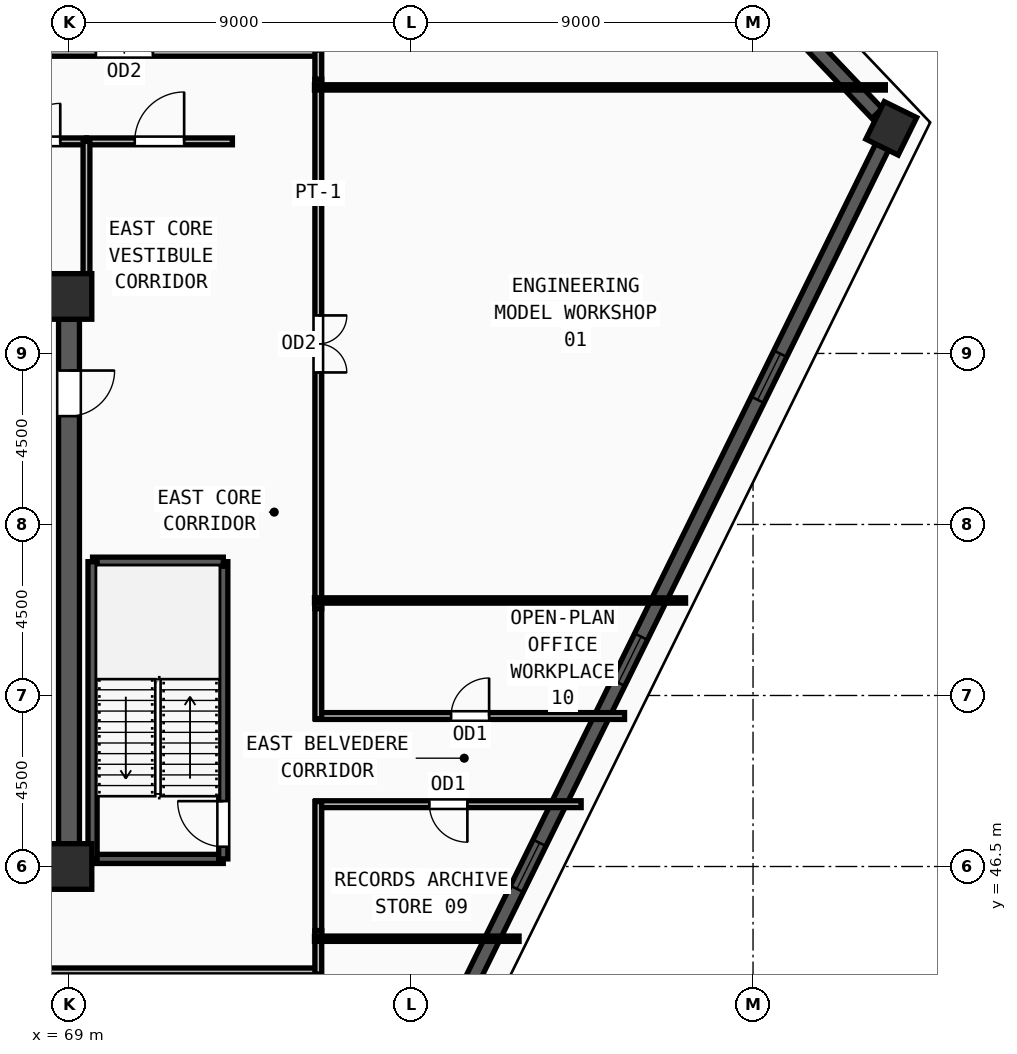
"""IFC4 building model, lengths in metres.
Left out: names, types, materials, properties, quantities, classifications, styles, units other than length and angle.
Written with IfcOpenShell. Run it as: python <this file> out.ifc"""

import sys

from ifc_helpers import new_model, si_unit, direction, frame, frame_2d, origin, origin_2d, place, context, subcontext, project, spatial, rectangle, extrude, source, transform, mapped, element, fill, save


model = new_model("IFC4")
c1 = context("Model", 3, precision=1e-05, world=origin(), true_north=direction((0.0, 1.0)))
c2 = subcontext(c1, "Body", "Model", "MODEL_VIEW")
j1 = project(units=[si_unit("LENGTHUNIT", "METRE"), si_unit("PLANEANGLEUNIT", "RADIAN")], contexts=[c1])
p1 = place(None, origin())
s1 = spatial("IfcSite", under=j1, at=p1, CompositionType="ELEMENT")
p2 = place(p1, origin())
s2 = spatial("IfcBuilding", under=s1, at=p2, CompositionType="ELEMENT")
p3 = place(p2, frame((0.0, 0.0, 286.5)))
s3 = spatial("IfcBuildingStorey", under=s2, at=p3, CompositionType="ELEMENT", Elevation=286.5)
m1 = source(origin(), c2, "Body", "SweptSolid", [
    extrude(rectangle(XDim=1.2, YDim=1.2, at=origin_2d()), origin(), (0.0, 0.0, 1.0), 3.75),
])
for number, where, z_axis, x_axis in (
    (1, (69.0, 46.5, 0.0), (0.0, 0.0, 1.0), (1.0, 0.0, 0.0)),
    (2, (69.0, 61.5, 0.0), (0.0, 0.0, 1.0), (1.0, 0.0, 0.0)),
):
    element("IfcColumn", number, at=place(p3, frame(where, z_axis=z_axis, x_axis=x_axis)), inside=s3, PredefinedType="COLUMN", context=c2, shape_type="MappedRepresentation", body=[
        mapped(m1, transform((0.0, 0.0, 0.0), x_axis=(1.0, 0.0, 0.0), y_axis=(0.0, 1.0, 0.0), z_axis=(0.0, 0.0, 1.0), scale=1.0)),
    ])
m2 = source(origin(), c2, "Body", "SweptSolid", [
    extrude(rectangle(XDim=1.1, YDim=0.95, at=origin_2d()), origin(), (0.0, 0.0, 1.0), 3.75),
])
p4 = place(p3, frame((90.637, 65.923, 0.0), z_axis=(0.0, 0.0, 1.0), x_axis=(0.441662447194, 0.897181298701, 0.0)))
e3 = element("IfcColumn", 3, at=p4, inside=s3, PredefinedType="COLUMN", context=c2, shape_type="MappedRepresentation", body=[
    mapped(m2, transform((0.0, 0.0, 0.0), x_axis=(1.0, 0.0, 0.0), y_axis=(0.0, 1.0, 0.0), z_axis=(0.0, 0.0, 1.0), scale=1.0)),
])
p5 = place(p3, frame((78.48, 41.226, 0.0), z_axis=(0.0, 0.0, 1.0), x_axis=(0.441646832519, 0.89718898529, 0.0)))
e4 = element("IfcWall", 4, at=p5, inside=s3, PredefinedType="SOLIDWALL", context=c2, shape_type="SweptSolid", body=[
    extrude(rectangle(XDim=26.988, YDim=0.38, at=frame_2d((13.494, 0.0))), origin(), (0.0, 0.0, 1.0), 3.57),
])
m3 = source(origin(), c2, "Body", "SweptSolid", [
    extrude(rectangle(XDim=1.35, YDim=1.85, at=frame_2d((0.675, 0.925))), frame((0.0, 0.2, 0.0), z_axis=(0.0, -1.0, 0.0), x_axis=(1.0, 0.0, 0.0)), (0.0, 0.0, 1.0), 0.4),
])
p6 = place(p5, frame((5.222, 0.0, 0.55)))
e5 = element("IfcOpeningElement", 5, at=p6, cuts=e4, PredefinedType="OPENING", context=c2, shape_type="MappedRepresentation", body=[
    mapped(m3, transform((0.0, 0.0, 0.0), x_axis=(1.0, 0.0, 0.0), y_axis=(0.0, 1.0, 0.0), z_axis=(0.0, 0.0, 1.0), scale=1.0)),
])
p7 = place(p5, frame((11.269, 0.0, 0.55)))
e6 = element("IfcOpeningElement", 6, at=p7, cuts=e4, PredefinedType="OPENING", context=c2, shape_type="MappedRepresentation", body=[
    mapped(m3, transform((0.0, 0.0, 0.0), x_axis=(1.0, 0.0, 0.0), y_axis=(0.0, 1.0, 0.0), z_axis=(0.0, 0.0, 1.0), scale=1.0)),
])
p8 = place(p5, frame((19.566, 0.0, 0.55)))
e7 = element("IfcOpeningElement", 7, at=p8, cuts=e4, PredefinedType="OPENING", context=c2, shape_type="MappedRepresentation", body=[
    mapped(m3, transform((0.0, 0.0, 0.0), x_axis=(1.0, 0.0, 0.0), y_axis=(0.0, 1.0, 0.0), z_axis=(0.0, 0.0, 1.0), scale=1.0)),
])
p9 = place(p3, frame((90.265, 66.314, 0.0), z_axis=(0.0, 0.0, 1.0), x_axis=(-0.689378640733, 0.724401193885, 0.0)))
e8 = element("IfcWall", 8, at=p9, inside=s3, PredefinedType="SOLIDWALL", context=c2, shape_type="SweptSolid", body=[
    extrude(rectangle(XDim=4.057, YDim=0.38, at=frame_2d((2.029, 0.0))), origin(), (0.0, 0.0, 1.0), 3.57),
])
p10 = place(p3, frame((69.0, 60.9, 0.0), z_axis=(0.0, 0.0, 1.0), x_axis=(0.0, -1.0, 0.0)))
e9 = element("IfcWall", 9, at=p10, inside=s3, PredefinedType="SHEAR", context=c2, shape_type="SweptSolid", body=[
    extrude(rectangle(XDim=13.8, YDim=0.55, at=frame_2d((6.9, 0.0))), origin(), (0.0, 0.0, 1.0), 3.57),
])
m4 = source(origin(), c2, "Body", "SweptSolid", [
    extrude(rectangle(XDim=1.2, YDim=2.2, at=frame_2d((0.6, 1.1))), frame((0.0, 0.285, 0.0), z_axis=(0.0, -1.0, 0.0), x_axis=(1.0, 0.0, 0.0)), (0.0, 0.0, 1.0), 0.57),
])
p11 = place(p10, frame((1.35, 0.0, 0.0)))
e10 = element("IfcOpeningElement", 10, at=p11, cuts=e9, PredefinedType="OPENING", context=c2, shape_type="MappedRepresentation", body=[
    mapped(m4, transform((0.0, 0.0, 0.0), x_axis=(1.0, 0.0, 0.0), y_axis=(0.0, 1.0, 0.0), z_axis=(0.0, 0.0, 1.0), scale=1.0)),
])
p12 = place(p3, frame((69.62, 46.7, 0.0), z_axis=(0.0, 0.0, 1.0), x_axis=(1.0, 0.0, 0.0)))
e11 = element("IfcWall", 11, at=p12, inside=s3, PredefinedType="SOLIDWALL", context=c2, shape_type="SweptSolid", body=[
    extrude(rectangle(XDim=3.44, YDim=0.24, at=frame_2d((1.72, 0.0))), origin(), (0.0, 0.0, 1.0), 3.57),
])
p13 = place(p3, frame((73.06, 46.7, 0.0), z_axis=(0.0, 0.0, 1.0), x_axis=(0.0, 1.0, 0.0)))
e12 = element("IfcWall", 12, at=p13, inside=s3, PredefinedType="SOLIDWALL", context=c2, shape_type="SweptSolid", body=[
    extrude(rectangle(XDim=7.82, YDim=0.24, at=frame_2d((3.91, 0.0))), origin(), (0.0, 0.0, 1.0), 3.57),
])
m5 = source(origin(), c2, "Body", "SweptSolid", [
    extrude(rectangle(XDim=1.2, YDim=2.2, at=frame_2d((0.6, 1.1))), frame((0.0, 0.13, 0.0), z_axis=(0.0, -1.0, 0.0), x_axis=(1.0, 0.0, 0.0)), (0.0, 0.0, 1.0), 0.26),
])
p14 = place(p13, frame((0.32, 0.0, 0.0)))
e13 = element("IfcOpeningElement", 13, at=p14, cuts=e12, PredefinedType="OPENING", context=c2, shape_type="MappedRepresentation", body=[
    mapped(m5, transform((0.0, 0.0, 0.0), x_axis=(1.0, 0.0, 0.0), y_axis=(0.0, 1.0, 0.0), z_axis=(0.0, 0.0, 1.0), scale=1.0)),
])
p15 = place(p3, frame((73.06, 54.52, 0.0), z_axis=(0.0, 0.0, 1.0), x_axis=(-1.0, 0.0, 0.0)))
e14 = element("IfcWall", 14, at=p15, inside=s3, PredefinedType="SOLIDWALL", context=c2, shape_type="SweptSolid", body=[
    extrude(rectangle(XDim=3.44, YDim=0.24, at=frame_2d((1.72, 0.0))), origin(), (0.0, 0.0, 1.0), 3.57),
])
p16 = place(p3, frame((69.62, 54.52, 0.0), z_axis=(0.0, 0.0, 1.0), x_axis=(0.0, -1.0, 0.0)))
e15 = element("IfcWall", 15, at=p16, inside=s3, PredefinedType="SOLIDWALL", context=c2, shape_type="SweptSolid", body=[
    extrude(rectangle(XDim=7.82, YDim=0.24, at=frame_2d((3.91, 0.0))), origin(), (0.0, 0.0, 1.0), 3.57),
])
p17 = place(p3, frame((67.08, 65.58, 0.0), z_axis=(0.0, 0.0, 1.0), x_axis=(1.0, 0.0, 0.0)))
e16 = element("IfcWall", 16, at=p17, inside=s3, PredefinedType="PARTITIONING", context=c2, shape_type="SweptSolid", body=[
    extrude(rectangle(XDim=2.38, YDim=0.18, at=frame_2d((1.19, 0.0))), origin(), (0.0, 0.0, 1.0), 3.57),
])
m6 = source(origin(), c2, "Body", "SweptSolid", [
    extrude(rectangle(XDim=1.0, YDim=2.2, at=frame_2d((0.5, 1.1))), frame((0.0, 0.1, 0.0), z_axis=(0.0, -1.0, 0.0), x_axis=(1.0, 0.0, 0.0)), (0.0, 0.0, 1.0), 0.2),
])
p18 = place(p17, frame((0.69, 0.0, 0.0)))
e17 = element("IfcOpeningElement", 17, at=p18, cuts=e16, PredefinedType="OPENING", context=c2, shape_type="MappedRepresentation", body=[
    mapped(m6, transform((0.0, 0.0, 0.0), x_axis=(1.0, 0.0, 0.0), y_axis=(0.0, 1.0, 0.0), z_axis=(0.0, 0.0, 1.0), scale=1.0)),
])
p19 = place(p3, frame((69.46, 65.58, 0.0), z_axis=(0.0, 0.0, 1.0), x_axis=(1.0, 0.0, 0.0)))
e18 = element("IfcWall", 18, at=p19, inside=s3, PredefinedType="PARTITIONING", context=c2, shape_type="SweptSolid", body=[
    extrude(rectangle(XDim=3.84, YDim=0.18, at=frame_2d((1.92, 0.0))), origin(), (0.0, 0.0, 1.0), 3.57),
])
m7 = source(origin(), c2, "Body", "SweptSolid", [
    extrude(rectangle(XDim=1.3, YDim=2.2, at=frame_2d((0.65, 1.1))), frame((0.0, 0.1, 0.0), z_axis=(0.0, -1.0, 0.0), x_axis=(1.0, 0.0, 0.0)), (0.0, 0.0, 1.0), 0.2),
])
p20 = place(p19, frame((1.27, 0.0, 0.0)))
e19 = element("IfcOpeningElement", 19, at=p20, cuts=e18, PredefinedType="OPENING", context=c2, shape_type="MappedRepresentation", body=[
    mapped(m7, transform((0.0, 0.0, 0.0), x_axis=(1.0, 0.0, 0.0), y_axis=(0.0, 1.0, 0.0), z_axis=(0.0, 0.0, 1.0), scale=1.0)),
])
p21 = place(p3, frame((75.56, 67.215, 0.0), z_axis=(0.0, 0.0, 1.0), x_axis=(0.0, -1.0, 0.0)))
e20 = element("IfcWall", 20, at=p21, inside=s3, PredefinedType="PARTITIONING", context=c2, shape_type="SweptSolid", body=[
    extrude(rectangle(XDim=13.93, YDim=0.18, at=frame_2d((6.965, 0.0))), origin(), (0.0, 0.0, 1.0), 3.57),
])
m8 = source(origin(), c2, "Body", "SweptSolid", [
    extrude(rectangle(XDim=1.5, YDim=2.2, at=frame_2d((0.75, 1.1))), frame((0.0, 0.1, 0.0), z_axis=(0.0, -1.0, 0.0), x_axis=(1.0, 0.0, 0.0)), (0.0, 0.0, 1.0), 0.2),
])
p22 = place(p21, frame((6.215, 0.0, 0.0)))
e21 = element("IfcOpeningElement", 21, at=p22, cuts=e20, PredefinedType="OPENING", context=c2, shape_type="MappedRepresentation", body=[
    mapped(m8, transform((0.0, 0.0, 0.0), x_axis=(1.0, 0.0, 0.0), y_axis=(0.0, 1.0, 0.0), z_axis=(0.0, 0.0, 1.0), scale=1.0)),
])
p23 = place(p3, frame((65.285, 67.91, 0.0), z_axis=(0.0, 0.0, 1.0), x_axis=(1.0, 0.0, 0.0)))
e22 = element("IfcWall", 22, at=p23, inside=s3, PredefinedType="PARTITIONING", context=c2, shape_type="SweptSolid", body=[
    extrude(rectangle(XDim=10.345, YDim=0.18, at=frame_2d((5.172, 0.0))), origin(), (0.0, 0.0, 1.0), 3.261),
])
p24 = place(p23, frame((4.422, 0.0, 0.0)))
e23 = element("IfcOpeningElement", 23, at=p24, cuts=e22, PredefinedType="OPENING", context=c2, shape_type="MappedRepresentation", body=[
    mapped(m8, transform((0.0, 0.0, 0.0), x_axis=(1.0, 0.0, 0.0), y_axis=(0.0, 1.0, 0.0), z_axis=(0.0, 0.0, 1.0), scale=1.0)),
])
p25 = place(p3, frame((75.63, 43.74, 0.0), z_axis=(0.0, 0.0, 1.0), x_axis=(-1.0, 0.0, 0.0)))
e24 = element("IfcWall", 24, at=p25, inside=s3, PredefinedType="PARTITIONING", context=c2, shape_type="SweptSolid", body=[
    extrude(rectangle(XDim=20.915, YDim=0.18, at=frame_2d((10.458, 0.0))), origin(), (0.0, 0.0, 1.0), 3.57),
])
p26 = place(p25, frame((9.707, 0.0, 0.0)))
e25 = element("IfcOpeningElement", 25, at=p26, cuts=e24, PredefinedType="OPENING", context=c2, shape_type="MappedRepresentation", body=[
    mapped(m8, transform((0.0, 0.0, 0.0), x_axis=(1.0, 0.0, 0.0), y_axis=(0.0, 1.0, 0.0), z_axis=(0.0, 0.0, 1.0), scale=1.0)),
])
p27 = place(p3, frame((82.477, 48.14, 0.0), z_axis=(0.0, 0.0, 1.0), x_axis=(-1.0, 0.0, 0.0)))
e26 = element("IfcWall", 26, at=p27, inside=s3, PredefinedType="PARTITIONING", context=c2, shape_type="SweptSolid", body=[
    extrude(rectangle(XDim=6.987, YDim=0.18, at=frame_2d((3.494, 0.0))), origin(), (0.0, 0.0, 1.0), 3.57),
])
p28 = place(p27, frame((2.994, 0.0, 0.0)))
e27 = element("IfcOpeningElement", 27, at=p28, cuts=e26, PredefinedType="OPENING", context=c2, shape_type="MappedRepresentation", body=[
    mapped(m6, transform((0.0, 0.0, 0.0), x_axis=(1.0, 0.0, 0.0), y_axis=(0.0, 1.0, 0.0), z_axis=(0.0, 0.0, 1.0), scale=1.0)),
])
p29 = place(p3, frame((75.49, 50.46, 0.0), z_axis=(0.0, 0.0, 1.0), x_axis=(1.0, 0.0, 0.0)))
e28 = element("IfcWall", 28, at=p29, inside=s3, PredefinedType="PARTITIONING", context=c2, shape_type="SweptSolid", body=[
    extrude(rectangle(XDim=8.129, YDim=0.18, at=frame_2d((4.064, 0.0))), origin(), (0.0, 0.0, 1.0), 3.57),
])
p30 = place(p29, frame((3.565, 0.0, 0.0)))
e29 = element("IfcOpeningElement", 29, at=p30, cuts=e28, PredefinedType="OPENING", context=c2, shape_type="MappedRepresentation", body=[
    mapped(m6, transform((0.0, 0.0, 0.0), x_axis=(1.0, 0.0, 0.0), y_axis=(0.0, 1.0, 0.0), z_axis=(0.0, 0.0, 1.0), scale=1.0)),
])
p31 = place(p3, frame((69.46, 61.95, 0.0), z_axis=(0.0, 0.0, 1.0), x_axis=(0.0, 1.0, 0.0)))
e30 = element("IfcWall", 30, at=p31, inside=s3, PredefinedType="PARTITIONING", context=c2, shape_type="SweptSolid", body=[
    extrude(rectangle(XDim=3.63, YDim=0.18, at=frame_2d((1.815, 0.0))), origin(), (0.0, 0.0, 1.0), 3.57),
])
p32 = place(p3, frame((75.56, 67.98, 0.0), z_axis=(0.0, 0.0, 1.0), x_axis=(0.0, -1.0, 0.0)))
e31 = element("IfcWall", 31, at=p32, inside=s3, PredefinedType="PARTITIONING", context=c2, shape_type="SweptSolid", body=[
    extrude(rectangle(XDim=0.765, YDim=0.18, at=frame_2d((0.382, 0.0))), origin(), (0.0, 0.0, 1.0), 3.57),
])
p33 = place(p3, frame((75.56, 44.815, 0.0), z_axis=(0.0, 0.0, 1.0), x_axis=(0.0, -1.0, 0.0)))
e32 = element("IfcWall", 32, at=p33, inside=s3, PredefinedType="PARTITIONING", context=c2, shape_type="SweptSolid", body=[
    extrude(rectangle(XDim=1.145, YDim=0.18, at=frame_2d((0.573, 0.0))), origin(), (0.0, 0.0, 1.0), 3.57),
])
p34 = place(p3, frame((75.56, 48.21, 0.0), z_axis=(0.0, 0.0, 1.0), x_axis=(0.0, -1.0, 0.0)))
e33 = element("IfcWall", 33, at=p34, inside=s3, PredefinedType="PARTITIONING", context=c2, shape_type="SweptSolid", body=[
    extrude(rectangle(XDim=3.395, YDim=0.18, at=frame_2d((1.698, 0.0))), origin(), (0.0, 0.0, 1.0), 3.57),
])
p35 = place(p3, frame((75.56, 53.285, 0.0), z_axis=(0.0, 0.0, 1.0), x_axis=(0.0, -1.0, 0.0)))
e34 = element("IfcWall", 34, at=p35, inside=s3, PredefinedType="PARTITIONING", context=c2, shape_type="SweptSolid", body=[
    extrude(rectangle(XDim=2.895, YDim=0.18, at=frame_2d((1.448, 0.0))), origin(), (0.0, 0.0, 1.0), 3.57),
])
p36 = place(p3, frame((75.46, 44.6, 0.0), z_axis=(0.0, 0.0, 1.0), x_axis=(1.0, 0.0, 0.0)))
e35 = element("IfcWall", 35, at=p36, inside=s3, PredefinedType="PARTITIONING", context=c2, shape_type="SweptSolid", body=[
    extrude(rectangle(XDim=5.383, YDim=0.14, at=frame_2d((2.691, 0.0))), origin(), (0.0, 0.0, 1.0), 3.57),
])
p37 = place(p3, frame((75.46, 53.5, 0.0), z_axis=(0.0, 0.0, 1.0), x_axis=(1.0, 0.0, 0.0)))
e36 = element("IfcWall", 36, at=p37, inside=s3, PredefinedType="PARTITIONING", context=c2, shape_type="SweptSolid", body=[
    extrude(rectangle(XDim=9.764, YDim=0.14, at=frame_2d((4.882, 0.0))), origin(), (0.0, 0.0, 1.0), 3.57),
])
p38 = place(p3, frame((75.46, 67.0, 0.0), z_axis=(0.0, 0.0, 1.0), x_axis=(1.0, 0.0, 0.0)))
e37 = element("IfcWall", 37, at=p38, inside=s3, PredefinedType="PARTITIONING", context=c2, shape_type="SweptSolid", body=[
    extrude(rectangle(XDim=15.021, YDim=0.14, at=frame_2d((7.51, 0.0))), origin(), (0.0, 0.0, 1.0), 3.57),
])
m9 = source(origin(), c2, "Body", "SweptSolid", [
    extrude(rectangle(XDim=1.35, YDim=1.85, at=frame_2d((0.675, 0.925))), frame((0.0, 0.03, 0.0), z_axis=(0.0, -1.0, 0.0), x_axis=(1.0, 0.0, 0.0)), (0.0, 0.0, 1.0), 0.06),
])
p39 = place(p6, origin())
e38 = element("IfcWindow", 38, at=p39, inside=s3, PartitioningType="SINGLE_PANEL", PredefinedType="WINDOW", context=c2, shape_type="MappedRepresentation", body=[
    mapped(m9, transform((0.0, 0.0, 0.0), x_axis=(1.0, 0.0, 0.0), y_axis=(0.0, 1.0, 0.0), z_axis=(0.0, 0.0, 1.0), scale=1.0)),
])
fill(e5, e38)
p40 = place(p7, origin())
e39 = element("IfcWindow", 39, at=p40, inside=s3, PartitioningType="SINGLE_PANEL", PredefinedType="WINDOW", context=c2, shape_type="MappedRepresentation", body=[
    mapped(m9, transform((0.0, 0.0, 0.0), x_axis=(1.0, 0.0, 0.0), y_axis=(0.0, 1.0, 0.0), z_axis=(0.0, 0.0, 1.0), scale=1.0)),
])
fill(e6, e39)
p41 = place(p8, origin())
e40 = element("IfcWindow", 40, at=p41, inside=s3, PartitioningType="SINGLE_PANEL", PredefinedType="WINDOW", context=c2, shape_type="MappedRepresentation", body=[
    mapped(m9, transform((0.0, 0.0, 0.0), x_axis=(1.0, 0.0, 0.0), y_axis=(0.0, 1.0, 0.0), z_axis=(0.0, 0.0, 1.0), scale=1.0)),
])
fill(e7, e40)
m10 = source(origin(), c2, "Body", "SweptSolid", [
    extrude(rectangle(XDim=1.2, YDim=2.2, at=frame_2d((0.6, 1.1))), frame((0.0, 0.025, 0.0), z_axis=(0.0, -1.0, 0.0), x_axis=(1.0, 0.0, 0.0)), (0.0, 0.0, 1.0), 0.05),
])
p42 = place(p11, origin())
e41 = element("IfcDoor", 41, at=p42, inside=s3, OperationType="SINGLE_SWING_LEFT", PredefinedType="DOOR", context=c2, shape_type="MappedRepresentation", body=[
    mapped(m10, transform((0.0, 0.0, 0.0), x_axis=(1.0, 0.0, 0.0), y_axis=(0.0, 1.0, 0.0), z_axis=(0.0, 0.0, 1.0), scale=1.0)),
])
fill(e10, e41)
p43 = place(p14, origin())
e42 = element("IfcDoor", 42, at=p43, inside=s3, OperationType="SINGLE_SWING_RIGHT", PredefinedType="DOOR", context=c2, shape_type="MappedRepresentation", body=[
    mapped(m10, transform((0.0, 0.0, 0.0), x_axis=(1.0, 0.0, 0.0), y_axis=(0.0, 1.0, 0.0), z_axis=(0.0, 0.0, 1.0), scale=1.0)),
])
fill(e13, e42)
m11 = source(origin(), c2, "Body", "SweptSolid", [
    extrude(rectangle(XDim=1.0, YDim=2.2, at=frame_2d((0.5, 1.1))), frame((0.0, 0.025, 0.0), z_axis=(0.0, -1.0, 0.0), x_axis=(1.0, 0.0, 0.0)), (0.0, 0.0, 1.0), 0.05),
])
p44 = place(p18, origin())
e43 = element("IfcDoor", 43, at=p44, inside=s3, OperationType="SINGLE_SWING_RIGHT", PredefinedType="DOOR", context=c2, shape_type="MappedRepresentation", body=[
    mapped(m11, transform((0.0, 0.0, 0.0), x_axis=(1.0, 0.0, 0.0), y_axis=(0.0, 1.0, 0.0), z_axis=(0.0, 0.0, 1.0), scale=1.0)),
])
fill(e17, e43)
m12 = source(origin(), c2, "Body", "SweptSolid", [
    extrude(rectangle(XDim=1.3, YDim=2.2, at=frame_2d((0.65, 1.1))), frame((0.0, 0.025, 0.0), z_axis=(0.0, -1.0, 0.0), x_axis=(1.0, 0.0, 0.0)), (0.0, 0.0, 1.0), 0.05),
])
p45 = place(p20, origin())
e44 = element("IfcDoor", 44, at=p45, inside=s3, OperationType="SINGLE_SWING_RIGHT", PredefinedType="DOOR", context=c2, shape_type="MappedRepresentation", body=[
    mapped(m12, transform((0.0, 0.0, 0.0), x_axis=(1.0, 0.0, 0.0), y_axis=(0.0, 1.0, 0.0), z_axis=(0.0, 0.0, 1.0), scale=1.0)),
])
fill(e19, e44)
m13 = source(origin(), c2, "Body", "SweptSolid", [
    extrude(rectangle(XDim=1.5, YDim=2.2, at=frame_2d((0.75, 1.1))), frame((0.0, 0.025, 0.0), z_axis=(0.0, -1.0, 0.0), x_axis=(1.0, 0.0, 0.0)), (0.0, 0.0, 1.0), 0.05),
])
p46 = place(p22, origin())
e45 = element("IfcDoor", 45, at=p46, inside=s3, OperationType="DOUBLE_DOOR_SINGLE_SWING", PredefinedType="DOOR", context=c2, shape_type="MappedRepresentation", body=[
    mapped(m13, transform((0.0, 0.0, 0.0), x_axis=(1.0, 0.0, 0.0), y_axis=(0.0, 1.0, 0.0), z_axis=(0.0, 0.0, 1.0), scale=1.0)),
])
fill(e21, e45)
p47 = place(p24, origin())
e46 = element("IfcDoor", 46, at=p47, inside=s3, OperationType="DOUBLE_DOOR_SINGLE_SWING", PredefinedType="DOOR", context=c2, shape_type="MappedRepresentation", body=[
    mapped(m13, transform((0.0, 0.0, 0.0), x_axis=(1.0, 0.0, 0.0), y_axis=(0.0, 1.0, 0.0), z_axis=(0.0, 0.0, 1.0), scale=1.0)),
])
fill(e23, e46)
p48 = place(p28, origin())
e47 = element("IfcDoor", 47, at=p48, inside=s3, OperationType="SINGLE_SWING_LEFT", PredefinedType="DOOR", context=c2, shape_type="MappedRepresentation", body=[
    mapped(m11, transform((0.0, 0.0, 0.0), x_axis=(1.0, 0.0, 0.0), y_axis=(0.0, 1.0, 0.0), z_axis=(0.0, 0.0, 1.0), scale=1.0)),
])
fill(e27, e47)
p49 = place(p30, origin())
e48 = element("IfcDoor", 48, at=p49, inside=s3, OperationType="SINGLE_SWING_RIGHT", PredefinedType="DOOR", context=c2, shape_type="MappedRepresentation", body=[
    mapped(m11, transform((0.0, 0.0, 0.0), x_axis=(1.0, 0.0, 0.0), y_axis=(0.0, 1.0, 0.0), z_axis=(0.0, 0.0, 1.0), scale=1.0)),
])
fill(e29, e48)
save(model, sys.argv[1])
